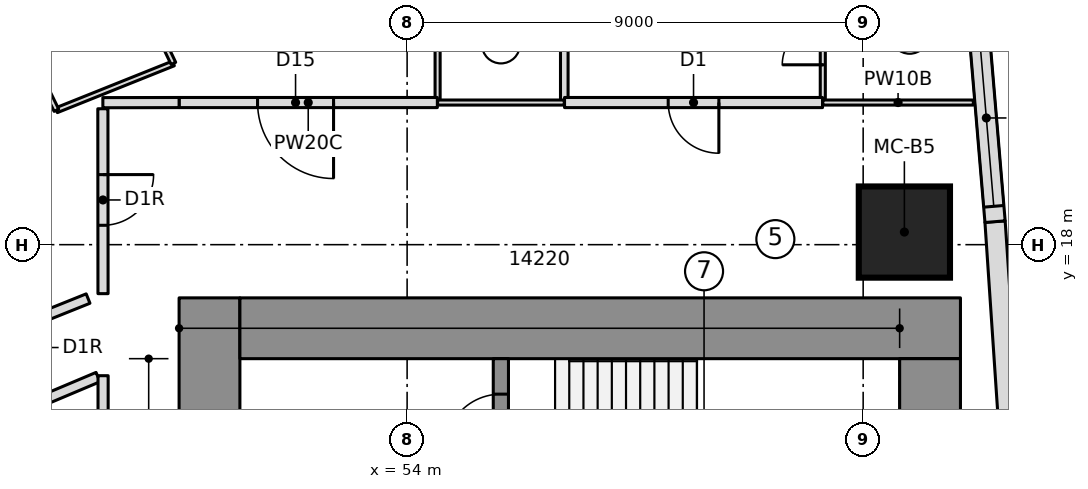
"""IFC4 building model, lengths in metres.
Left out: names, types, materials, properties, quantities, classifications, styles, units other than length and angle.
Written with IfcOpenShell. Run it as: python <this file> out.ifc"""

import sys

from ifc_helpers import new_model, si_unit, direction, frame, frame_2d, origin, origin_2d, place, context, subcontext, project, spatial, polyline, rectangle, outline, extrude, element, fill, save


model = new_model("IFC4")
c1 = context("Model", 3, precision=1e-05, world=origin(), true_north=direction((0.0, 1.0)))
c2 = subcontext(c1, "Body", "Model", "MODEL_VIEW")
j1 = project(units=[si_unit("LENGTHUNIT", "METRE"), si_unit("PLANEANGLEUNIT", "RADIAN")], contexts=[c1])
p1 = place(None, origin())
s1 = spatial("IfcSite", under=j1, at=p1, CompositionType="ELEMENT")
p2 = place(p1, origin())
s2 = spatial("IfcBuilding", under=s1, at=p2, CompositionType="ELEMENT")
p3 = place(p2, frame((0.0, 0.0, 43.15)))
s3 = spatial("IfcBuildingStorey", under=s2, at=p3, CompositionType="ELEMENT", Elevation=43.15)
p4 = place(p3, frame((50.1, 6.65, 0.0), z_axis=(0.0, 0.0, 1.0), x_axis=(0.0, 1.0, 0.0)))
e1 = element("IfcWall", 1, at=p4, inside=s3, PredefinedType="SHEAR", context=c2, shape_type="SweptSolid", body=[
    extrude(rectangle(XDim=10.3, YDim=1.2, at=frame_2d((5.15, 0.0))), origin(), (0.0, 0.0, 1.0), 3.55),
])
p5 = place(p4, frame((6.5, 0.0, 0.0)))
e2 = element("IfcOpeningElement", 2, at=p5, cuts=e1, PredefinedType="OPENING", context=c2, shape_type="SweptSolid", body=[
    extrude(rectangle(XDim=1.1, YDim=2.1, at=frame_2d((0.55, 1.05))), frame((0.0, 0.61, 0.0), z_axis=(0.0, -1.0, 0.0), x_axis=(1.0, 0.0, 0.0)), (0.0, 0.0, 1.0), 1.22),
])
p6 = place(p3, frame((50.7, 16.35, 0.0), z_axis=(0.0, 0.0, 1.0), x_axis=(1.0, 0.0, 0.0)))
e3 = element("IfcWall", 3, at=p6, inside=s3, PredefinedType="SHEAR", context=c2, shape_type="SweptSolid", body=[
    extrude(rectangle(XDim=14.22, YDim=1.2, at=frame_2d((7.11, 0.0))), origin(), (0.0, 0.0, 1.0), 3.55),
])
p7 = place(p3, frame((64.32, 9.95, 0.0), z_axis=(0.0, 0.0, 1.0), x_axis=(0.0, 1.0, 0.0)))
e4 = element("IfcWall", 4, at=p7, inside=s3, PredefinedType="SHEAR", context=c2, shape_type="SweptSolid", body=[
    extrude(rectangle(XDim=5.8, YDim=1.2, at=frame_2d((2.9, 0.0))), origin(), (0.0, 0.0, 1.0), 3.55),
])
p8 = place(p3, frame((55.85, 10.35, 0.0), z_axis=(0.0, 0.0, 1.0), x_axis=(0.0, 1.0, 0.0)))
e5 = element("IfcWall", 5, at=p8, inside=s3, PredefinedType="SHEAR", context=c2, shape_type="SweptSolid", body=[
    extrude(rectangle(XDim=5.4, YDim=0.3, at=frame_2d((2.7, 0.0))), origin(), (0.0, 0.0, 1.0), 3.55),
])
p9 = place(p8, frame((1.43, 0.0, 0.0)))
e6 = element("IfcOpeningElement", 6, at=p9, cuts=e5, PredefinedType="OPENING", context=c2, shape_type="SweptSolid", body=[
    extrude(rectangle(XDim=1.1, YDim=2.1, at=frame_2d((0.55, 1.05))), frame((0.0, 0.16, 0.0), z_axis=(0.0, -1.0, 0.0), x_axis=(1.0, 0.0, 0.0)), (0.0, 0.0, 1.0), 0.32),
])
p10 = place(p8, frame((3.6, 0.0, 0.0)))
e7 = element("IfcOpeningElement", 7, at=p10, cuts=e5, PredefinedType="OPENING", context=c2, shape_type="SweptSolid", body=[
    extrude(rectangle(XDim=1.1, YDim=2.1, at=frame_2d((0.55, 1.05))), frame((0.0, 0.16, 0.0), z_axis=(0.0, -1.0, 0.0), x_axis=(1.0, 0.0, 0.0)), (0.0, 0.0, 1.0), 0.32),
])
p11 = place(p3, frame((63.813, 18.249, 0.0), z_axis=(0.0, 0.0, 1.0), x_axis=(1.0, 0.0, 0.0)))
e8 = element("IfcColumn", 8, at=p11, inside=s3, PredefinedType="COLUMN", context=c2, shape_type="SweptSolid", body=[
    extrude(rectangle(XDim=1.8, YDim=1.8, at=origin_2d()), origin(), (0.0, 0.0, 1.0), 3.55),
])
p12 = place(p3, frame((65.878, 14.36, 0.0), z_axis=(0.0, 0.0, 1.0), x_axis=(-0.067087430225, 0.997747100575, 0.0)))
e9 = element("IfcWall", 9, at=p12, inside=s3, PredefinedType="NOTDEFINED", context=c2, shape_type="SweptSolid", body=[
    extrude(outline(polyline([(-0.002, -0.2), (4.107, -0.2), (4.103, 0.2), (0.002, 0.2), (-0.002, -0.2)])), origin(), (0.0, 0.0, 1.0), 3.25),
])
p13 = place(p3, frame((65.603, 18.455, 0.0), z_axis=(0.0, 0.0, 1.0), x_axis=(-0.083793550906, 0.996483136248, 0.0)))
e10 = element("IfcWall", 10, at=p13, inside=s3, PredefinedType="NOTDEFINED", context=c2, shape_type="SweptSolid", body=[
    extrude(outline(polyline([(-0.002, -0.2), (4.136, -0.2), (4.074, 0.2), (0.002, 0.2), (-0.002, -0.2)])), origin(), (0.0, 0.0, 1.0), 3.25),
])
p14 = place(p13, frame((0.302, 0.0, 0.9)))
e11 = element("IfcOpeningElement", 11, at=p14, cuts=e10, PredefinedType="OPENING", context=c2, shape_type="SweptSolid", body=[
    extrude(rectangle(XDim=3.5, YDim=1.8, at=frame_2d((1.75, 0.9))), frame((0.0, 0.21, 0.0), z_axis=(0.0, -1.0, 0.0), x_axis=(1.0, 0.0, 0.0)), (0.0, 0.0, 1.0), 0.42),
])
p15 = place(p3, frame((54.602, 20.8, 0.0), z_axis=(0.0, 0.0, 1.0), x_axis=(0.0, 1.0, 0.0)))
e12 = element("IfcWall", 12, at=p15, inside=s3, PredefinedType="PARTITIONING", context=c2, shape_type="SweptSolid", body=[
    extrude(rectangle(XDim=2.3, YDim=0.1, at=frame_2d((1.15, 0.0))), origin(), (0.0, 0.0, 1.0), 3.25),
])
p16 = place(p3, frame((62.203, 20.8, 0.0), z_axis=(0.0, 0.0, 1.0), x_axis=(0.0, 1.0, 0.0)))
e13 = element("IfcWall", 13, at=p16, inside=s3, PredefinedType="PARTITIONING", context=c2, shape_type="SweptSolid", body=[
    extrude(rectangle(XDim=2.3, YDim=0.1, at=frame_2d((1.15, 0.0))), origin(), (0.0, 0.0, 1.0), 3.25),
])
p17 = place(p16, frame((0.75, 0.0, 0.0)))
e14 = element("IfcOpeningElement", 14, at=p17, cuts=e13, PredefinedType="OPENING", context=c2, shape_type="SweptSolid", body=[
    extrude(rectangle(XDim=0.8, YDim=2.1, at=frame_2d((0.4, 1.05))), frame((0.0, 0.06, 0.0), z_axis=(0.0, -1.0, 0.0), x_axis=(1.0, 0.0, 0.0)), (0.0, 0.0, 1.0), 0.12),
])
p18 = place(p3, frame((57.102, 20.8, 0.0), z_axis=(0.0, 0.0, 1.0), x_axis=(0.0, 1.0, 0.0)))
e15 = element("IfcWall", 15, at=p18, inside=s3, PredefinedType="PARTITIONING", context=c2, shape_type="SweptSolid", body=[
    extrude(rectangle(XDim=7.787, YDim=0.15, at=frame_2d((3.894, 0.0))), origin(), (0.0, 0.0, 1.0), 3.25),
])
p19 = place(p3, frame((49.388, 21.577, 0.0), z_axis=(0.0, 0.0, 1.0), x_axis=(-0.928266690687, -0.371915247014, 0.0)))
e16 = element("IfcWall", 16, at=p19, inside=s3, PredefinedType="PARTITIONING", context=c2, shape_type="SweptSolid", body=[
    extrude(rectangle(XDim=2.487, YDim=0.1, at=frame_2d((1.244, 0.0))), origin(), (0.0, 0.0, 1.0), 3.25),
])
p20 = place(p3, frame((47.079, 20.652, 0.0), z_axis=(0.0, 0.0, 1.0), x_axis=(-0.438171240168, 0.898891519756, 0.0)))
e17 = element("IfcWall", 17, at=p20, inside=s3, PredefinedType="PARTITIONING", context=c2, shape_type="SweptSolid", body=[
    extrude(rectangle(XDim=2.306, YDim=0.1, at=frame_2d((1.153, 0.0))), origin(), (0.0, 0.0, 1.0), 3.25),
])
p21 = place(p3, frame((43.85, 13.677, 0.0), z_axis=(0.0, 0.0, 1.0), x_axis=(0.921265924084, 0.388933281068, 0.0)))
e18 = element("IfcWall", 18, at=p21, inside=s3, PredefinedType="PARTITIONING", context=c2, shape_type="SweptSolid", body=[
    extrude(rectangle(XDim=4.396, YDim=0.2, at=frame_2d((2.198, 0.0))), origin(), (0.0, 0.0, 1.0), 3.25),
])
p22 = place(p21, frame((1.508, 0.0, 0.0)))
e19 = element("IfcOpeningElement", 19, at=p22, cuts=e18, PredefinedType="OPENING", context=c2, shape_type="SweptSolid", body=[
    extrude(rectangle(XDim=1.0, YDim=2.1, at=frame_2d((0.5, 1.05))), frame((0.0, 0.11, 0.0), z_axis=(0.0, -1.0, 0.0), x_axis=(1.0, 0.0, 0.0)), (0.0, 0.0, 1.0), 0.22),
])
p23 = place(p3, frame((54.597, 20.805, 0.0), z_axis=(0.0, 0.0, 1.0), x_axis=(-1.0, 0.0, 0.0)))
e20 = element("IfcWall", 20, at=p23, inside=s3, PredefinedType="PARTITIONING", context=c2, shape_type="SweptSolid", body=[
    extrude(rectangle(XDim=5.097, YDim=0.2, at=frame_2d((2.548, 0.0))), origin(), (0.0, 0.0, 1.0), 3.25),
])
p24 = place(p23, frame((2.048, 0.0, 0.0)))
e21 = element("IfcOpeningElement", 21, at=p24, cuts=e20, PredefinedType="OPENING", context=c2, shape_type="SweptSolid", body=[
    extrude(rectangle(XDim=1.5, YDim=2.1, at=frame_2d((0.75, 1.05))), frame((0.0, 0.11, 0.0), z_axis=(0.0, -1.0, 0.0), x_axis=(1.0, 0.0, 0.0)), (0.0, 0.0, 1.0), 0.22),
])
p25 = place(p3, frame((62.198, 20.805, 0.0), z_axis=(0.0, 0.0, 1.0), x_axis=(-1.0, 0.0, 0.0)))
e22 = element("IfcWall", 22, at=p25, inside=s3, PredefinedType="PARTITIONING", context=c2, shape_type="SweptSolid", body=[
    extrude(rectangle(XDim=5.092, YDim=0.2, at=frame_2d((2.546, 0.0))), origin(), (0.0, 0.0, 1.0), 3.25),
])
p26 = place(p25, frame((2.046, 0.0, 0.0)))
e23 = element("IfcOpeningElement", 23, at=p26, cuts=e22, PredefinedType="OPENING", context=c2, shape_type="SweptSolid", body=[
    extrude(rectangle(XDim=1.0, YDim=2.1, at=frame_2d((0.5, 1.05))), frame((0.0, 0.11, 0.0), z_axis=(0.0, -1.0, 0.0), x_axis=(1.0, 0.0, 0.0)), (0.0, 0.0, 1.0), 0.22),
])
p27 = place(p3, frame((57.102, 20.805, 0.0), z_axis=(0.0, 0.0, 1.0), x_axis=(-1.0, 0.0, 0.0)))
e24 = element("IfcWall", 24, at=p27, inside=s3, PredefinedType="PARTITIONING", context=c2, shape_type="SweptSolid", body=[
    extrude(rectangle(XDim=2.5, YDim=0.1, at=frame_2d((1.25, 0.0))), origin(), (0.0, 0.0, 1.0), 3.25),
])
p28 = place(p3, frame((65.175, 20.805, 0.0), z_axis=(0.0, 0.0, 1.0), x_axis=(-1.0, 0.0, 0.0)))
e25 = element("IfcWall", 25, at=p28, inside=s3, PredefinedType="PARTITIONING", context=c2, shape_type="SweptSolid", body=[
    extrude(rectangle(XDim=2.971, YDim=0.1, at=frame_2d((1.486, 0.0))), origin(), (0.0, 0.0, 1.0), 3.25),
])
p29 = place(p3, frame((48.396, 23.657, 0.0), z_axis=(0.0, 0.0, 1.0), x_axis=(0.4306119303, -0.902537182327, 0.0)))
e26 = element("IfcWall", 26, at=p29, inside=s3, PredefinedType="PARTITIONING", context=c2, shape_type="SweptSolid", body=[
    extrude(rectangle(XDim=2.305, YDim=0.1, at=frame_2d((1.152, 0.0))), origin(), (0.0, 0.0, 1.0), 3.25),
])
p30 = place(p3, frame((47.704, 16.936, 0.0), z_axis=(0.0, 0.0, 1.0), x_axis=(-0.927985537407, -0.372616213232, 0.0)))
e27 = element("IfcWall", 27, at=p30, inside=s3, PredefinedType="PARTITIONING", context=c2, shape_type="SweptSolid", body=[
    extrude(rectangle(XDim=0.927, YDim=0.2, at=frame_2d((0.463, 0.0))), origin(), (0.0, 0.0, 1.0), 3.25),
])
p31 = place(p3, frame((48.0, 15.414, 0.0), z_axis=(0.0, 0.0, 1.0), x_axis=(0.0, -1.0, 0.0)))
e28 = element("IfcWall", 28, at=p31, inside=s3, PredefinedType="PARTITIONING", context=c2, shape_type="SweptSolid", body=[
    extrude(rectangle(XDim=30.828, YDim=0.2, at=frame_2d((15.414, 0.0))), origin(), (0.0, 0.0, 1.0), 3.25),
])
p32 = place(p3, frame((49.5, 20.805, 0.0), z_axis=(0.0, 0.0, 1.0), x_axis=(-0.999998683182, -0.001622847587, 0.0)))
e29 = element("IfcWall", 29, at=p32, inside=s3, PredefinedType="PARTITIONING", context=c2, shape_type="SweptSolid", body=[
    extrude(rectangle(XDim=1.504, YDim=0.2, at=frame_2d((0.752, 0.0))), origin(), (0.0, 0.0, 1.0), 3.25),
])
p33 = place(p3, frame((47.996, 20.682, 0.0), z_axis=(0.0, 0.0, 1.0), x_axis=(0.000869739418, -0.999999621777, 0.0)))
e30 = element("IfcWall", 30, at=p33, inside=s3, PredefinedType="PARTITIONING", context=c2, shape_type="SweptSolid", body=[
    extrude(rectangle(XDim=3.649, YDim=0.2, at=frame_2d((1.825, 0.0))), origin(), (0.0, 0.0, 1.0), 3.25),
])
p34 = place(p33, frame((1.3, 0.0, 0.0)))
e31 = element("IfcOpeningElement", 31, at=p34, cuts=e30, PredefinedType="OPENING", context=c2, shape_type="SweptSolid", body=[
    extrude(rectangle(XDim=1.0, YDim=2.1, at=frame_2d((0.5, 1.05))), frame((0.0, 0.11, 0.0), z_axis=(0.0, -1.0, 0.0), x_axis=(1.0, 0.0, 0.0)), (0.0, 0.0, 1.0), 0.22),
])
p35 = place(p14, origin())
e32 = element("IfcWindow", 32, at=p35, inside=s3, PartitioningType="SINGLE_PANEL", PredefinedType="WINDOW", context=c2, shape_type="SweptSolid", body=[
    extrude(rectangle(XDim=3.5, YDim=1.8, at=frame_2d((1.75, 0.9))), frame((0.0, 0.17, 0.0), z_axis=(0.0, -1.0, 0.0), x_axis=(1.0, 0.0, 0.0)), (0.0, 0.0, 1.0), 0.06),
])
fill(e11, e32)
p36 = place(p17, origin())
e33 = element("IfcDoor", 33, at=p36, inside=s3, OperationType="SINGLE_SWING_LEFT", PredefinedType="DOOR", context=c2, shape_type="SweptSolid", body=[
    extrude(rectangle(XDim=0.8, YDim=2.1, at=frame_2d((0.4, 1.05))), frame((0.0, 0.025, 0.0), z_axis=(0.0, -1.0, 0.0), x_axis=(1.0, 0.0, 0.0)), (0.0, 0.0, 1.0), 0.05),
])
fill(e14, e33)
p37 = place(p24, origin())
e34 = element("IfcDoor", 34, at=p37, inside=s3, OperationType="DOUBLE_DOOR_SINGLE_SWING", PredefinedType="DOOR", context=c2, shape_type="SweptSolid", body=[
    extrude(rectangle(XDim=1.5, YDim=2.1, at=frame_2d((0.75, 1.05))), frame((0.0, 0.025, 0.0), z_axis=(0.0, -1.0, 0.0), x_axis=(1.0, 0.0, 0.0)), (0.0, 0.0, 1.0), 0.05),
])
fill(e21, e34)
p38 = place(p26, origin())
e35 = element("IfcDoor", 35, at=p38, inside=s3, OperationType="SINGLE_SWING_LEFT", PredefinedType="DOOR", context=c2, shape_type="SweptSolid", body=[
    extrude(rectangle(XDim=1.0, YDim=2.1, at=frame_2d((0.5, 1.05))), frame((0.0, 0.025, 0.0), z_axis=(0.0, -1.0, 0.0), x_axis=(1.0, 0.0, 0.0)), (0.0, 0.0, 1.0), 0.05),
])
fill(e23, e35)
p39 = place(p34, origin())
e36 = element("IfcDoor", 36, at=p39, inside=s3, OperationType="SINGLE_SWING_RIGHT", PredefinedType="DOOR", context=c2, shape_type="SweptSolid", body=[
    extrude(rectangle(XDim=1.0, YDim=2.1, at=frame_2d((0.5, 1.05))), frame((0.0, 0.025, 0.0), z_axis=(0.0, -1.0, 0.0), x_axis=(1.0, 0.0, 0.0)), (0.0, 0.0, 1.0), 0.05),
])
fill(e31, e36)
p40 = place(p10, origin())
e37 = element("IfcDoor", 37, at=p40, inside=s3, OperationType="SINGLE_SWING_RIGHT", PredefinedType="DOOR", context=c2, shape_type="SweptSolid", body=[
    extrude(rectangle(XDim=1.1, YDim=2.1, at=frame_2d((0.55, 1.05))), frame((0.0, 0.025, 0.0), z_axis=(0.0, -1.0, 0.0), x_axis=(1.0, 0.0, 0.0)), (0.0, 0.0, 1.0), 0.05),
])
fill(e7, e37)
save(model, sys.argv[1])
